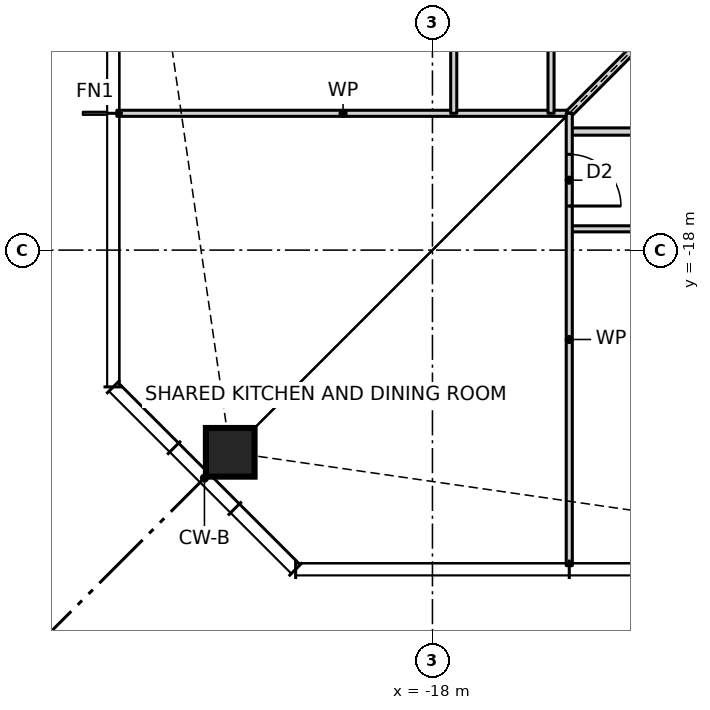
"""IFC4 building model, lengths in metres.
Left out: names, types, materials, properties, quantities, classifications, styles, units other than length and angle.
Written with IfcOpenShell. Run it as: python <this file> out.ifc"""

import sys

from ifc_helpers import new_model, si_unit, direction, frame, frame_2d, origin, origin_2d, place, context, subcontext, project, spatial, rectangle, hollow_rectangle, extrude, element, fill, save


model = new_model("IFC4")
c1 = context("Model", 3, precision=1e-05, world=origin(), true_north=direction((0.0, 1.0)))
c2 = subcontext(c1, "Body", "Model", "MODEL_VIEW")
j1 = project(units=[si_unit("LENGTHUNIT", "METRE"), si_unit("PLANEANGLEUNIT", "RADIAN")], contexts=[c1])
p1 = place(None, origin())
s1 = spatial("IfcSite", under=j1, at=p1, CompositionType="ELEMENT")
p2 = place(p1, origin())
s2 = spatial("IfcBuilding", under=s1, at=p2, CompositionType="ELEMENT")
p3 = place(p2, frame((0.0, 0.0, 43.0)))
s3 = spatial("IfcBuildingStorey", under=s2, at=p3, CompositionType="ELEMENT", Elevation=43.0)
p4 = place(p3, frame((-21.326, -21.326, 0.0), z_axis=(0.0, 0.0, 1.0), x_axis=(1.0, 0.0, 0.0)))
e1 = element("IfcColumn", 1, at=p4, inside=s3, PredefinedType="COLUMN", context=c2, shape_type="SweptSolid", body=[
    extrude(hollow_rectangle(XDim=0.8, YDim=0.8, WallThickness=0.09, at=origin_2d()), origin(), (0.0, 0.0, 1.0), 3.5),
])
p5 = place(p3, frame((-15.75, -17.65, 0.0), z_axis=(0.0, 0.0, 1.0), x_axis=(1.0, 0.0, 0.0)))
e2 = element("IfcWall", 2, at=p5, inside=s3, PredefinedType="PARTITIONING", context=c2, shape_type="SweptSolid", body=[
    extrude(rectangle(XDim=27.0, YDim=0.1, at=frame_2d((13.5, 0.0))), origin(), (0.0, 0.0, 1.0), 3.0),
])
p6 = place(p5, frame((1.8, 0.0, 0.0)))
e3 = element("IfcOpeningElement", 3, at=p6, cuts=e2, PredefinedType="OPENING", context=c2, shape_type="SweptSolid", body=[
    extrude(rectangle(XDim=0.9, YDim=2.1, at=frame_2d((0.45, 1.05))), frame((0.0, 0.06, 0.0), z_axis=(0.0, -1.0, 0.0), x_axis=(1.0, 0.0, 0.0)), (0.0, 0.0, 1.0), 0.12),
])
p7 = place(p5, frame((6.3, 0.0, 0.0)))
e4 = element("IfcOpeningElement", 4, at=p7, cuts=e2, PredefinedType="OPENING", context=c2, shape_type="SweptSolid", body=[
    extrude(rectangle(XDim=0.9, YDim=2.1, at=frame_2d((0.45, 1.05))), frame((0.0, 0.06, 0.0), z_axis=(0.0, -1.0, 0.0), x_axis=(1.0, 0.0, 0.0)), (0.0, 0.0, 1.0), 0.12),
])
p8 = place(p5, frame((10.8, 0.0, 0.0)))
e5 = element("IfcOpeningElement", 5, at=p8, cuts=e2, PredefinedType="OPENING", context=c2, shape_type="SweptSolid", body=[
    extrude(rectangle(XDim=0.9, YDim=2.1, at=frame_2d((0.45, 1.05))), frame((0.0, 0.06, 0.0), z_axis=(0.0, -1.0, 0.0), x_axis=(1.0, 0.0, 0.0)), (0.0, 0.0, 1.0), 0.12),
])
p9 = place(p5, frame((15.3, 0.0, 0.0)))
e6 = element("IfcOpeningElement", 6, at=p9, cuts=e2, PredefinedType="OPENING", context=c2, shape_type="SweptSolid", body=[
    extrude(rectangle(XDim=0.9, YDim=2.1, at=frame_2d((0.45, 1.05))), frame((0.0, 0.06, 0.0), z_axis=(0.0, -1.0, 0.0), x_axis=(1.0, 0.0, 0.0)), (0.0, 0.0, 1.0), 0.12),
])
p10 = place(p5, frame((19.8, 0.0, 0.0)))
e7 = element("IfcOpeningElement", 7, at=p10, cuts=e2, PredefinedType="OPENING", context=c2, shape_type="SweptSolid", body=[
    extrude(rectangle(XDim=0.9, YDim=2.1, at=frame_2d((0.45, 1.05))), frame((0.0, 0.06, 0.0), z_axis=(0.0, -1.0, 0.0), x_axis=(1.0, 0.0, 0.0)), (0.0, 0.0, 1.0), 0.12),
])
p11 = place(p5, frame((24.3, 0.0, 0.0)))
e8 = element("IfcOpeningElement", 8, at=p11, cuts=e2, PredefinedType="OPENING", context=c2, shape_type="SweptSolid", body=[
    extrude(rectangle(XDim=0.9, YDim=2.1, at=frame_2d((0.45, 1.05))), frame((0.0, 0.06, 0.0), z_axis=(0.0, -1.0, 0.0), x_axis=(1.0, 0.0, 0.0)), (0.0, 0.0, 1.0), 0.12),
])
p12 = place(p3, frame((-15.75, -16.05, 0.0), z_axis=(0.0, 0.0, 1.0), x_axis=(1.0, 0.0, 0.0)))
e9 = element("IfcWall", 9, at=p12, inside=s3, PredefinedType="PARTITIONING", context=c2, shape_type="SweptSolid", body=[
    extrude(rectangle(XDim=3.6, YDim=0.12, at=frame_2d((1.8, 0.0))), origin(), (0.0, 0.0, 1.0), 3.27),
])
p13 = place(p3, frame((-23.19, -15.75, 0.0), z_axis=(0.0, 0.0, 1.0), x_axis=(1.0, 0.0, 0.0)))
e10 = element("IfcWall", 10, at=p13, inside=s3, PredefinedType="PARTITIONING", context=c2, shape_type="SweptSolid", body=[
    extrude(rectangle(XDim=7.44, YDim=0.1, at=frame_2d((3.72, 0.0))), origin(), (0.0, 0.0, 1.0), 3.27),
])
p14 = place(p3, frame((-15.75, -15.75, 0.0), z_axis=(0.0, 0.0, 1.0), x_axis=(0.707106781187, 0.707106781187, 0.0)))
e11 = element("IfcWall", 11, at=p14, inside=s3, PredefinedType="PARTITIONING", context=c2, shape_type="SweptSolid", body=[
    extrude(rectangle(XDim=5.869, YDim=0.12, at=frame_2d((2.935, 0.0))), origin(), (0.0, 0.0, 1.0), 2.343),
])
p15 = place(p3, frame((-15.75, -23.19, 0.0), z_axis=(0.0, 0.0, 1.0), x_axis=(0.0, 1.0, 0.0)))
e12 = element("IfcWall", 12, at=p15, inside=s3, PredefinedType="PARTITIONING", context=c2, shape_type="SweptSolid", body=[
    extrude(rectangle(XDim=7.44, YDim=0.1, at=frame_2d((3.72, 0.0))), origin(), (0.0, 0.0, 1.0), 3.27),
])
p16 = place(p15, frame((5.915, 0.0, 0.0)))
e13 = element("IfcOpeningElement", 13, at=p16, cuts=e12, PredefinedType="OPENING", context=c2, shape_type="SweptSolid", body=[
    extrude(rectangle(XDim=0.85, YDim=2.1, at=frame_2d((0.425, 1.05))), frame((0.0, 0.06, 0.0), z_axis=(0.0, -1.0, 0.0), x_axis=(1.0, 0.0, 0.0)), (0.0, 0.0, 1.0), 0.12),
])
p17 = place(p3, frame((-16.05, -15.75, 0.0), z_axis=(0.0, 0.0, 1.0), x_axis=(0.0, 1.0, 0.0)))
e14 = element("IfcWall", 14, at=p17, inside=s3, PredefinedType="PARTITIONING", context=c2, shape_type="SweptSolid", body=[
    extrude(rectangle(XDim=14.08, YDim=0.1, at=frame_2d((7.04, 0.0))), origin(), (0.0, 0.0, 1.0), 3.27),
])
p18 = place(p17, frame((6.615, 0.0, 0.0)))
e15 = element("IfcOpeningElement", 15, at=p18, cuts=e14, PredefinedType="OPENING", context=c2, shape_type="SweptSolid", body=[
    extrude(rectangle(XDim=0.85, YDim=2.1, at=frame_2d((0.425, 1.05))), frame((0.0, 0.06, 0.0), z_axis=(0.0, -1.0, 0.0), x_axis=(1.0, 0.0, 0.0)), (0.0, 0.0, 1.0), 0.12),
])
p19 = place(p3, frame((-17.65, -15.75, 0.0), z_axis=(0.0, 0.0, 1.0), x_axis=(0.0, 1.0, 0.0)))
e16 = element("IfcWall", 16, at=p19, inside=s3, PredefinedType="PARTITIONING", context=c2, shape_type="SweptSolid", body=[
    extrude(rectangle(XDim=27.0, YDim=0.1, at=frame_2d((13.5, 0.0))), origin(), (0.0, 0.0, 1.0), 3.27),
])
p20 = place(p19, frame((24.3, 0.0, 0.0)))
e17 = element("IfcOpeningElement", 17, at=p20, cuts=e16, PredefinedType="OPENING", context=c2, shape_type="SweptSolid", body=[
    extrude(rectangle(XDim=0.9, YDim=2.1, at=frame_2d((0.45, 1.05))), frame((0.0, 0.06, 0.0), z_axis=(0.0, -1.0, 0.0), x_axis=(1.0, 0.0, 0.0)), (0.0, 0.0, 1.0), 0.12),
])
p21 = place(p19, frame((19.8, 0.0, 0.0)))
e18 = element("IfcOpeningElement", 18, at=p21, cuts=e16, PredefinedType="OPENING", context=c2, shape_type="SweptSolid", body=[
    extrude(rectangle(XDim=0.9, YDim=2.1, at=frame_2d((0.45, 1.05))), frame((0.0, 0.06, 0.0), z_axis=(0.0, -1.0, 0.0), x_axis=(1.0, 0.0, 0.0)), (0.0, 0.0, 1.0), 0.12),
])
p22 = place(p19, frame((15.3, 0.0, 0.0)))
e19 = element("IfcOpeningElement", 19, at=p22, cuts=e16, PredefinedType="OPENING", context=c2, shape_type="SweptSolid", body=[
    extrude(rectangle(XDim=0.9, YDim=2.1, at=frame_2d((0.45, 1.05))), frame((0.0, 0.06, 0.0), z_axis=(0.0, -1.0, 0.0), x_axis=(1.0, 0.0, 0.0)), (0.0, 0.0, 1.0), 0.12),
])
p23 = place(p19, frame((10.8, 0.0, 0.0)))
e20 = element("IfcOpeningElement", 20, at=p23, cuts=e16, PredefinedType="OPENING", context=c2, shape_type="SweptSolid", body=[
    extrude(rectangle(XDim=0.9, YDim=2.1, at=frame_2d((0.45, 1.05))), frame((0.0, 0.06, 0.0), z_axis=(0.0, -1.0, 0.0), x_axis=(1.0, 0.0, 0.0)), (0.0, 0.0, 1.0), 0.12),
])
p24 = place(p19, frame((6.3, 0.0, 0.0)))
e21 = element("IfcOpeningElement", 21, at=p24, cuts=e16, PredefinedType="OPENING", context=c2, shape_type="SweptSolid", body=[
    extrude(rectangle(XDim=0.9, YDim=2.1, at=frame_2d((0.45, 1.05))), frame((0.0, 0.06, 0.0), z_axis=(0.0, -1.0, 0.0), x_axis=(1.0, 0.0, 0.0)), (0.0, 0.0, 1.0), 0.12),
])
p25 = place(p19, frame((1.8, 0.0, 0.0)))
e22 = element("IfcOpeningElement", 22, at=p25, cuts=e16, PredefinedType="OPENING", context=c2, shape_type="SweptSolid", body=[
    extrude(rectangle(XDim=0.9, YDim=2.1, at=frame_2d((0.45, 1.05))), frame((0.0, 0.06, 0.0), z_axis=(0.0, -1.0, 0.0), x_axis=(1.0, 0.0, 0.0)), (0.0, 0.0, 1.0), 0.12),
])
p26 = place(p16, frame((0.85, 0.0, 0.0), z_axis=(0.0, 0.0, 1.0), x_axis=(-1.0, 0.0, 0.0)))
e23 = element("IfcDoor", 23, at=p26, inside=s3, OperationType="SINGLE_SWING_RIGHT", PredefinedType="DOOR", context=c2, shape_type="SweptSolid", body=[
    extrude(rectangle(XDim=0.85, YDim=2.1, at=frame_2d((0.425, 1.05))), frame((0.0, 0.025, 0.0), z_axis=(0.0, -1.0, 0.0), x_axis=(1.0, 0.0, 0.0)), (0.0, 0.0, 1.0), 0.05),
])
fill(e13, e23)
save(model, sys.argv[1])
